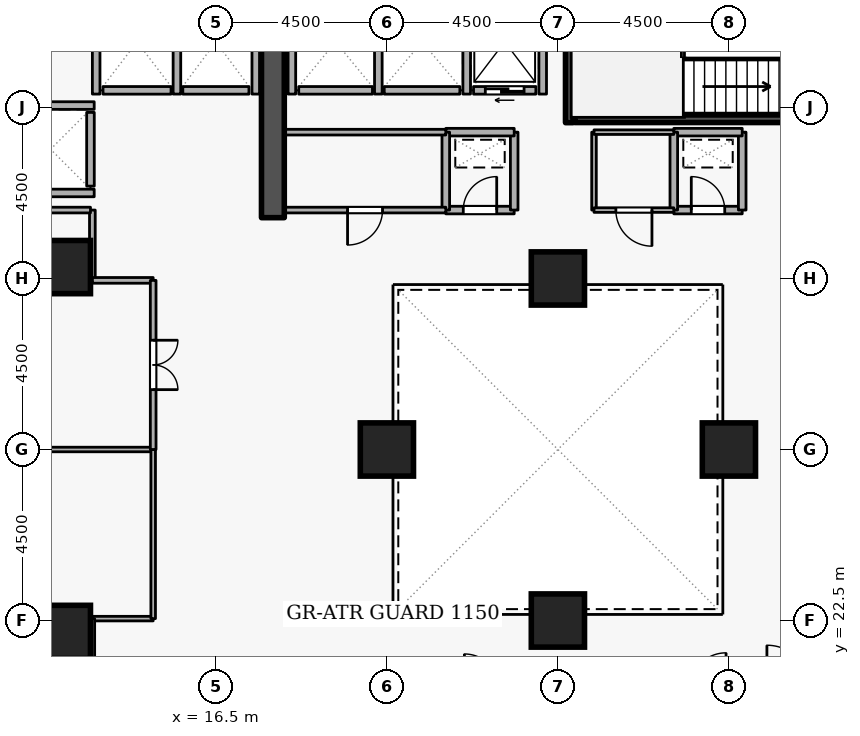
"""IFC4 building model, lengths in metres.
Left out: names, types, materials, properties, quantities, classifications, styles, units other than length and angle.
Written with IfcOpenShell. Run it as: python <this file> out.ifc"""

import sys

from ifc_helpers import new_model, si_unit, direction, frame, frame_2d, origin, origin_2d, place, context, subcontext, project, spatial, rectangle, extrude, element, fill, save


model = new_model("IFC4")
c1 = context("Model", 3, precision=1e-05, world=origin(), true_north=direction((0.0, 1.0)))
c2 = subcontext(c1, "Body", "Model", "MODEL_VIEW")
j1 = project(units=[si_unit("LENGTHUNIT", "METRE"), si_unit("PLANEANGLEUNIT", "RADIAN")], contexts=[c1])
p1 = place(None, origin())
s1 = spatial("IfcSite", under=j1, at=p1, CompositionType="ELEMENT")
p2 = place(p1, origin())
s2 = spatial("IfcBuilding", under=s1, at=p2, CompositionType="ELEMENT")
p3 = place(p2, frame((0.0, 0.0, 31.5)))
s3 = spatial("IfcBuildingStorey", under=s2, at=p3, CompositionType="ELEMENT", Elevation=31.5)
p4 = place(p3, frame((18.0, 33.1, 0.0), z_axis=(0.0, 0.0, 1.0), x_axis=(0.0, 1.0, 0.0)))
e1 = element("IfcWall", 1, at=p4, inside=s3, PredefinedType="SHEAR", context=c2, shape_type="SweptSolid", body=[
    extrude(rectangle(XDim=5.7, YDim=0.6, at=frame_2d((2.85, 0.0))), origin(), (0.0, 0.0, 1.0), 3.6),
])
for number, where, z_axis, x_axis in (
    (2, (12.5, 22.2, 0.0), (0.0, 0.0, 1.0), (1.0, 0.0, 0.0)),
    (3, (12.5, 31.8, 0.0), (0.0, 0.0, 1.0), (1.0, 0.0, 0.0)),
    (4, (25.5, 22.5, 0.0), (0.0, 0.0, 1.0), (1.0, 0.0, 0.0)),
    (5, (25.5, 31.5, 0.0), (0.0, 0.0, 1.0), (1.0, 0.0, 0.0)),
    (6, (21.0, 27.0, 0.0), (0.0, 0.0, 1.0), (1.0, 0.0, 0.0)),
    (7, (30.0, 27.0, 0.0), (0.0, 0.0, 1.0), (1.0, 0.0, 0.0)),
):
    element("IfcColumn", number, at=place(p3, frame(where, z_axis=z_axis, x_axis=x_axis)), inside=s3, PredefinedType="COLUMN", context=c2, shape_type="SweptSolid", body=[
        extrude(rectangle(XDim=1.4, YDim=1.4, at=origin_2d()), origin(), (0.0, 0.0, 1.0), 3.6),
    ])
p5 = place(p3, frame((24.92, 36.45, 0.0), z_axis=(0.0, 0.0, 1.0), x_axis=(-1.0, 0.0, 0.0)))
e8 = element("IfcWall", 8, at=p5, inside=s3, PredefinedType="STANDARD", context=c2, shape_type="SweptSolid", body=[
    extrude(rectangle(XDim=1.64, YDim=0.2, at=frame_2d((0.82, 0.0))), origin(), (0.0, 0.0, 1.0), 3.34),
])
p6 = place(p5, frame((0.31, 0.0, 0.0)))
e9 = element("IfcOpeningElement", 9, at=p6, cuts=e8, PredefinedType="OPENING", context=c2, shape_type="SweptSolid", body=[
    extrude(rectangle(XDim=1.02, YDim=2.06, at=frame_2d((0.51, 1.03))), frame((0.0, 0.11, 0.0), z_axis=(0.0, -1.0, 0.0), x_axis=(1.0, 0.0, 0.0)), (0.0, 0.0, 1.0), 0.22),
])
p7 = place(p3, frame((22.92, 36.45, 0.0), z_axis=(0.0, 0.0, 1.0), x_axis=(-1.0, 0.0, 0.0)))
e10 = element("IfcWall", 10, at=p7, inside=s3, PredefinedType="STANDARD", context=c2, shape_type="SweptSolid", body=[
    extrude(rectangle(XDim=1.99, YDim=0.2, at=frame_2d((0.995, 0.0))), origin(), (0.0, 0.0, 1.0), 3.34),
])
p8 = place(p3, frame((20.62, 36.45, 0.0), z_axis=(0.0, 0.0, 1.0), x_axis=(-1.0, 0.0, 0.0)))
e11 = element("IfcWall", 11, at=p8, inside=s3, PredefinedType="STANDARD", context=c2, shape_type="SweptSolid", body=[
    extrude(rectangle(XDim=1.94, YDim=0.2, at=frame_2d((0.97, 0.0))), origin(), (0.0, 0.0, 1.0), 3.34),
])
p9 = place(p3, frame((17.37, 36.45, 0.0), z_axis=(0.0, 0.0, 1.0), x_axis=(-1.0, 0.0, 0.0)))
e12 = element("IfcWall", 12, at=p9, inside=s3, PredefinedType="STANDARD", context=c2, shape_type="SweptSolid", body=[
    extrude(rectangle(XDim=1.74, YDim=0.2, at=frame_2d((0.87, 0.0))), origin(), (0.0, 0.0, 1.0), 3.34),
])
p10 = place(p3, frame((15.32, 36.45, 0.0), z_axis=(0.0, 0.0, 1.0), x_axis=(-1.0, 0.0, 0.0)))
e13 = element("IfcWall", 13, at=p10, inside=s3, PredefinedType="STANDARD", context=c2, shape_type="SweptSolid", body=[
    extrude(rectangle(XDim=1.79, YDim=0.2, at=frame_2d((0.895, 0.0))), origin(), (0.0, 0.0, 1.0), 3.34),
])
p11 = place(p3, frame((13.2, 33.93, 0.0), z_axis=(0.0, 0.0, 1.0), x_axis=(0.0, 1.0, 0.0)))
e14 = element("IfcWall", 14, at=p11, inside=s3, PredefinedType="STANDARD", context=c2, shape_type="SweptSolid", body=[
    extrude(rectangle(XDim=1.94, YDim=0.2, at=frame_2d((0.97, 0.0))), origin(), (0.0, 0.0, 1.0), 3.34),
])
for number, where, z_axis, x_axis in (
    (15, (25.1, 36.352, 0.0), (0.0, 0.0, 1.0), (0.0, 1.0, 0.0)),
    (16, (23.1, 36.352, 0.0), (0.0, 0.0, 1.0), (0.0, 1.0, 0.0)),
    (17, (20.775, 36.352, 0.0), (0.0, 0.0, 1.0), (0.0, 1.0, 0.0)),
    (18, (18.5, 36.352, 0.0), (0.0, 0.0, 1.0), (0.0, 1.0, 0.0)),
):
    element("IfcWall", number, at=place(p3, frame(where, z_axis=z_axis, x_axis=x_axis)), inside=s3, PredefinedType="STANDARD", context=c2, shape_type="SweptSolid", body=[
        extrude(rectangle(XDim=2.436, YDim=0.2, at=frame_2d((1.218, 0.0))), origin(), (0.0, 0.0, 1.0), 3.34),
    ])
p12 = place(p3, frame((17.55, 36.352, 0.0), z_axis=(0.0, 0.0, 1.0), x_axis=(0.0, 1.0, 0.0)))
e19 = element("IfcWall", 19, at=p12, inside=s3, PredefinedType="STANDARD", context=c2, shape_type="SweptSolid", body=[
    extrude(rectangle(XDim=2.636, YDim=0.2, at=frame_2d((1.318, 0.0))), origin(), (0.0, 0.0, 1.0), 2.545),
])
for number, where, z_axis, x_axis in (
    (20, (15.475, 36.352, 0.0), (0.0, 0.0, 1.0), (0.0, 1.0, 0.0)),
    (21, (13.35, 36.352, 0.0), (0.0, 0.0, 1.0), (0.0, 1.0, 0.0)),
):
    element("IfcWall", number, at=place(p3, frame(where, z_axis=z_axis, x_axis=x_axis)), inside=s3, PredefinedType="STANDARD", context=c2, shape_type="SweptSolid", body=[
        extrude(rectangle(XDim=2.636, YDim=0.2, at=frame_2d((1.318, 0.0))), origin(), (0.0, 0.0, 1.0), 3.34),
    ])
for number, where, z_axis, x_axis in (
    (22, (11.002, 36.05, 0.0), (0.0, 0.0, 1.0), (1.0, 0.0, 0.0)),
    (23, (11.002, 33.75, 0.0), (0.0, 0.0, 1.0), (1.0, 0.0, 0.0)),
):
    element("IfcWall", number, at=place(p3, frame(where, z_axis=z_axis, x_axis=x_axis)), inside=s3, PredefinedType="STANDARD", context=c2, shape_type="SweptSolid", body=[
        extrude(rectangle(XDim=2.296, YDim=0.2, at=frame_2d((1.148, 0.0))), origin(), (0.0, 0.0, 1.0), 3.34),
    ])
p13 = place(p3, frame((25.8, 35.6, 0.0), z_axis=(0.0, 0.0, 1.0), x_axis=(0.0, 1.0, 0.0)))
e24 = element("IfcWall", 24, at=p13, inside=s3, PredefinedType="SHEAR", context=c2, shape_type="SweptSolid", body=[
    extrude(rectangle(XDim=3.35, YDim=0.2, at=frame_2d((1.675, 0.0))), origin(), (0.0, 0.0, 1.0), 3.6),
])
p14 = place(p3, frame((25.95, 35.703, 0.0), z_axis=(0.0, 0.0, 1.0), x_axis=(1.0, 0.0, 0.0)))
e25 = element("IfcWall", 25, at=p14, inside=s3, PredefinedType="SHEAR", context=c2, shape_type="SweptSolid", body=[
    extrude(rectangle(XDim=7.1, YDim=0.2, at=frame_2d((3.55, 0.0))), origin(), (0.0, 0.0, 1.0), 3.6),
])
p15 = place(p3, frame((22.55, 33.3, 0.0), z_axis=(0.0, 0.0, 1.0), x_axis=(1.0, 0.0, 0.0)))
e26 = element("IfcWall", 26, at=p15, inside=s3, PredefinedType="STANDARD", context=c2, shape_type="SweptSolid", body=[
    extrude(rectangle(XDim=1.8, YDim=0.2, at=frame_2d((0.9, 0.0))), origin(), (0.0, 0.0, 1.0), 3.34),
])
p16 = place(p15, frame((0.46, 0.0, 0.0)))
e27 = element("IfcOpeningElement", 27, at=p16, cuts=e26, PredefinedType="OPENING", context=c2, shape_type="SweptSolid", body=[
    extrude(rectangle(XDim=0.88, YDim=2.04, at=frame_2d((0.44, 1.02))), frame((0.0, 0.11, 0.0), z_axis=(0.0, -1.0, 0.0), x_axis=(1.0, 0.0, 0.0)), (0.0, 0.0, 1.0), 0.22),
])
p17 = place(p3, frame((24.35, 33.3, 0.0), z_axis=(0.0, 0.0, 1.0), x_axis=(0.0, 1.0, 0.0)))
e28 = element("IfcWall", 28, at=p17, inside=s3, PredefinedType="STANDARD", context=c2, shape_type="SweptSolid", body=[
    extrude(rectangle(XDim=2.05, YDim=0.2, at=frame_2d((1.025, 0.0))), origin(), (0.0, 0.0, 1.0), 3.34),
])
p18 = place(p3, frame((24.35, 35.35, 0.0), z_axis=(0.0, 0.0, 1.0), x_axis=(-1.0, 0.0, 0.0)))
e29 = element("IfcWall", 29, at=p18, inside=s3, PredefinedType="STANDARD", context=c2, shape_type="SweptSolid", body=[
    extrude(rectangle(XDim=1.8, YDim=0.2, at=frame_2d((0.9, 0.0))), origin(), (0.0, 0.0, 1.0), 3.34),
])
p19 = place(p3, frame((22.55, 35.35, 0.0), z_axis=(0.0, 0.0, 1.0), x_axis=(0.0, -1.0, 0.0)))
e30 = element("IfcWall", 30, at=p19, inside=s3, PredefinedType="STANDARD", context=c2, shape_type="SweptSolid", body=[
    extrude(rectangle(XDim=2.05, YDim=0.2, at=frame_2d((1.025, 0.0))), origin(), (0.0, 0.0, 1.0), 3.34),
])
p20 = place(p3, frame((28.55, 33.3, 0.0), z_axis=(0.0, 0.0, 1.0), x_axis=(1.0, 0.0, 0.0)))
e31 = element("IfcWall", 31, at=p20, inside=s3, PredefinedType="STANDARD", context=c2, shape_type="SweptSolid", body=[
    extrude(rectangle(XDim=1.8, YDim=0.2, at=frame_2d((0.9, 0.0))), origin(), (0.0, 0.0, 1.0), 3.34),
])
p21 = place(p20, frame((0.46, 0.0, 0.0)))
e32 = element("IfcOpeningElement", 32, at=p21, cuts=e31, PredefinedType="OPENING", context=c2, shape_type="SweptSolid", body=[
    extrude(rectangle(XDim=0.88, YDim=2.04, at=frame_2d((0.44, 1.02))), frame((0.0, 0.11, 0.0), z_axis=(0.0, -1.0, 0.0), x_axis=(1.0, 0.0, 0.0)), (0.0, 0.0, 1.0), 0.22),
])
p22 = place(p3, frame((30.35, 33.3, 0.0), z_axis=(0.0, 0.0, 1.0), x_axis=(0.0, 1.0, 0.0)))
e33 = element("IfcWall", 33, at=p22, inside=s3, PredefinedType="STANDARD", context=c2, shape_type="SweptSolid", body=[
    extrude(rectangle(XDim=2.05, YDim=0.2, at=frame_2d((1.025, 0.0))), origin(), (0.0, 0.0, 1.0), 3.34),
])
p23 = place(p3, frame((30.35, 35.35, 0.0), z_axis=(0.0, 0.0, 1.0), x_axis=(-1.0, 0.0, 0.0)))
e34 = element("IfcWall", 34, at=p23, inside=s3, PredefinedType="STANDARD", context=c2, shape_type="SweptSolid", body=[
    extrude(rectangle(XDim=1.8, YDim=0.2, at=frame_2d((0.9, 0.0))), origin(), (0.0, 0.0, 1.0), 3.34),
])
p24 = place(p3, frame((28.55, 35.35, 0.0), z_axis=(0.0, 0.0, 1.0), x_axis=(0.0, -1.0, 0.0)))
e35 = element("IfcWall", 35, at=p24, inside=s3, PredefinedType="STANDARD", context=c2, shape_type="SweptSolid", body=[
    extrude(rectangle(XDim=2.05, YDim=0.2, at=frame_2d((1.025, 0.0))), origin(), (0.0, 0.0, 1.0), 3.34),
])
p25 = place(p3, frame((18.3, 35.35, 0.0), z_axis=(0.0, 0.0, 1.0), x_axis=(1.0, 0.0, 0.0)))
e36 = element("IfcWall", 36, at=p25, inside=s3, PredefinedType="PARTITIONING", context=c2, shape_type="SweptSolid", body=[
    extrude(rectangle(XDim=4.25, YDim=0.15, at=frame_2d((2.125, 0.0))), origin(), (0.0, 0.0, 1.0), 3.34),
])
p26 = place(p3, frame((22.55, 33.3, 0.0), z_axis=(0.0, 0.0, 1.0), x_axis=(-1.0, 0.0, 0.0)))
e37 = element("IfcWall", 37, at=p26, inside=s3, PredefinedType="PARTITIONING", context=c2, shape_type="SweptSolid", body=[
    extrude(rectangle(XDim=4.25, YDim=0.15, at=frame_2d((2.125, 0.0))), origin(), (0.0, 0.0, 1.0), 3.34),
])
p27 = place(p26, frame((1.665, 0.0, 0.0)))
e38 = element("IfcOpeningElement", 38, at=p27, cuts=e37, PredefinedType="OPENING", context=c2, shape_type="SweptSolid", body=[
    extrude(rectangle(XDim=0.92, YDim=2.08, at=frame_2d((0.46, 1.04))), frame((0.0, 0.085, 0.0), z_axis=(0.0, -1.0, 0.0), x_axis=(1.0, 0.0, 0.0)), (0.0, 0.0, 1.0), 0.17),
])
p28 = place(p3, frame((26.45, 33.3, 0.0), z_axis=(0.0, 0.0, 1.0), x_axis=(0.0, 1.0, 0.0)))
e39 = element("IfcWall", 39, at=p28, inside=s3, PredefinedType="PARTITIONING", context=c2, shape_type="SweptSolid", body=[
    extrude(rectangle(XDim=2.05, YDim=0.12, at=frame_2d((1.025, 0.0))), origin(), (0.0, 0.0, 1.0), 3.34),
])
p29 = place(p3, frame((26.45, 35.35, 0.0), z_axis=(0.0, 0.0, 1.0), x_axis=(1.0, 0.0, 0.0)))
e40 = element("IfcWall", 40, at=p29, inside=s3, PredefinedType="PARTITIONING", context=c2, shape_type="SweptSolid", body=[
    extrude(rectangle(XDim=2.1, YDim=0.12, at=frame_2d((1.05, 0.0))), origin(), (0.0, 0.0, 1.0), 3.34),
])
p30 = place(p3, frame((28.55, 33.3, 0.0), z_axis=(0.0, 0.0, 1.0), x_axis=(-1.0, 0.0, 0.0)))
e41 = element("IfcWall", 41, at=p30, inside=s3, PredefinedType="PARTITIONING", context=c2, shape_type="SweptSolid", body=[
    extrude(rectangle(XDim=2.1, YDim=0.12, at=frame_2d((1.05, 0.0))), origin(), (0.0, 0.0, 1.0), 3.34),
])
p31 = place(p30, frame((0.575, 0.0, 0.0)))
e42 = element("IfcOpeningElement", 42, at=p31, cuts=e41, PredefinedType="OPENING", context=c2, shape_type="SweptSolid", body=[
    extrude(rectangle(XDim=0.95, YDim=2.1, at=frame_2d((0.475, 1.05))), frame((0.0, 0.07, 0.0), z_axis=(0.0, -1.0, 0.0), x_axis=(1.0, 0.0, 0.0)), (0.0, 0.0, 1.0), 0.14),
])
p32 = place(p3, frame((14.85, 22.55, 0.0), z_axis=(0.0, 0.0, 1.0), x_axis=(-1.0, 0.0, 0.0)))
e43 = element("IfcWall", 43, at=p32, inside=s3, PredefinedType="PARTITIONING", context=c2, shape_type="SweptSolid", body=[
    extrude(rectangle(XDim=1.6, YDim=0.12, at=frame_2d((0.8, 0.0))), origin(), (0.0, 0.0, 1.0), 3.34),
])
p33 = place(p3, frame((13.25, 22.55, 0.0), z_axis=(0.0, 0.0, 1.0), x_axis=(0.0, -1.0, 0.0)))
e44 = element("IfcWall", 44, at=p33, inside=s3, PredefinedType="PARTITIONING", context=c2, shape_type="SweptSolid", body=[
    extrude(rectangle(XDim=1.85, YDim=0.12, at=frame_2d((0.925, 0.0))), origin(), (0.0, 0.0, 1.0), 3.34),
])
p34 = place(p3, frame((1.28, 27.0, 0.0), z_axis=(0.0, 0.0, 1.0), x_axis=(1.0, 0.0, 0.0)))
e45 = element("IfcWall", 45, at=p34, inside=s3, PredefinedType="PARTITIONING", context=c2, shape_type="SweptSolid", body=[
    extrude(rectangle(XDim=13.57, YDim=0.12, at=frame_2d((6.785, 0.0))), origin(), (0.0, 0.0, 1.0), 2.878),
])
p35 = place(p3, frame((14.85, 27.0, 0.0), z_axis=(0.0, 0.0, 1.0), x_axis=(0.0, -1.0, 0.0)))
e46 = element("IfcWall", 46, at=p35, inside=s3, PredefinedType="PARTITIONING", context=c2, shape_type="SweptSolid", body=[
    extrude(rectangle(XDim=4.45, YDim=0.12, at=frame_2d((2.225, 0.0))), origin(), (0.0, 0.0, 1.0), 3.34),
])
p36 = place(p3, frame((13.25, 33.3, 0.0), z_axis=(0.0, 0.0, 1.0), x_axis=(0.0, -1.0, 0.0)))
e47 = element("IfcWall", 47, at=p36, inside=s3, PredefinedType="PARTITIONING", context=c2, shape_type="SweptSolid", body=[
    extrude(rectangle(XDim=1.85, YDim=0.15, at=frame_2d((0.925, 0.0))), origin(), (0.0, 0.0, 1.0), 3.34),
])
p37 = place(p3, frame((13.25, 31.45, 0.0), z_axis=(0.0, 0.0, 1.0), x_axis=(1.0, 0.0, 0.0)))
e48 = element("IfcWall", 48, at=p37, inside=s3, PredefinedType="PARTITIONING", context=c2, shape_type="SweptSolid", body=[
    extrude(rectangle(XDim=1.6, YDim=0.15, at=frame_2d((0.8, 0.0))), origin(), (0.0, 0.0, 1.0), 3.34),
])
p38 = place(p3, frame((14.85, 31.45, 0.0), z_axis=(0.0, 0.0, 1.0), x_axis=(0.0, -1.0, 0.0)))
e49 = element("IfcWall", 49, at=p38, inside=s3, PredefinedType="PARTITIONING", context=c2, shape_type="SweptSolid", body=[
    extrude(rectangle(XDim=4.45, YDim=0.15, at=frame_2d((2.225, 0.0))), origin(), (0.0, 0.0, 1.0), 3.34),
])
p39 = place(p38, frame((1.575, 0.0, 0.0)))
e50 = element("IfcOpeningElement", 50, at=p39, cuts=e49, PredefinedType="OPENING", context=c2, shape_type="SweptSolid", body=[
    extrude(rectangle(XDim=1.3, YDim=2.12, at=frame_2d((0.65, 1.06))), frame((0.0, 0.085, 0.0), z_axis=(0.0, -1.0, 0.0), x_axis=(1.0, 0.0, 0.0)), (0.0, 0.0, 1.0), 0.17),
])
p40 = place(p3, frame((10.9, 33.3, 0.0), z_axis=(0.0, 0.0, 1.0), x_axis=(1.0, 0.0, 0.0)))
e51 = element("IfcWall", 51, at=p40, inside=s3, PredefinedType="PARTITIONING", context=c2, shape_type="SweptSolid", body=[
    extrude(rectangle(XDim=2.3, YDim=0.15, at=frame_2d((1.15, 0.0))), origin(), (0.0, 0.0, 1.0), 3.34),
])
p41 = place(p6, origin())
e52 = element("IfcDoor", 52, at=p41, inside=s3, OperationType="SLIDING_TO_LEFT", PredefinedType="DOOR", context=c2, shape_type="SweptSolid", body=[
    extrude(rectangle(XDim=1.02, YDim=2.06, at=frame_2d((0.51, 1.03))), frame((0.0, 0.025, 0.0), z_axis=(0.0, -1.0, 0.0), x_axis=(1.0, 0.0, 0.0)), (0.0, 0.0, 1.0), 0.05),
])
fill(e9, e52)
p42 = place(p16, origin())
e53 = element("IfcDoor", 53, at=p42, inside=s3, OperationType="SINGLE_SWING_RIGHT", PredefinedType="DOOR", context=c2, shape_type="SweptSolid", body=[
    extrude(rectangle(XDim=0.88, YDim=2.04, at=frame_2d((0.44, 1.02))), frame((0.0, 0.025, 0.0), z_axis=(0.0, -1.0, 0.0), x_axis=(1.0, 0.0, 0.0)), (0.0, 0.0, 1.0), 0.05),
])
fill(e27, e53)
p43 = place(p21, origin())
e54 = element("IfcDoor", 54, at=p43, inside=s3, OperationType="SINGLE_SWING_LEFT", PredefinedType="DOOR", context=c2, shape_type="SweptSolid", body=[
    extrude(rectangle(XDim=0.88, YDim=2.04, at=frame_2d((0.44, 1.02))), frame((0.0, 0.025, 0.0), z_axis=(0.0, -1.0, 0.0), x_axis=(1.0, 0.0, 0.0)), (0.0, 0.0, 1.0), 0.05),
])
fill(e32, e54)
p44 = place(p27, origin())
e55 = element("IfcDoor", 55, at=p44, inside=s3, OperationType="SINGLE_SWING_RIGHT", PredefinedType="DOOR", context=c2, shape_type="SweptSolid", body=[
    extrude(rectangle(XDim=0.92, YDim=2.08, at=frame_2d((0.46, 1.04))), frame((0.0, 0.025, 0.0), z_axis=(0.0, -1.0, 0.0), x_axis=(1.0, 0.0, 0.0)), (0.0, 0.0, 1.0), 0.05),
])
fill(e38, e55)
p45 = place(p31, origin())
e56 = element("IfcDoor", 56, at=p45, inside=s3, OperationType="SINGLE_SWING_LEFT", PredefinedType="DOOR", context=c2, shape_type="SweptSolid", body=[
    extrude(rectangle(XDim=0.95, YDim=2.1, at=frame_2d((0.475, 1.05))), frame((0.0, 0.025, 0.0), z_axis=(0.0, -1.0, 0.0), x_axis=(1.0, 0.0, 0.0)), (0.0, 0.0, 1.0), 0.05),
])
fill(e42, e56)
p46 = place(p39, origin())
e57 = element("IfcDoor", 57, at=p46, inside=s3, OperationType="DOUBLE_DOOR_SINGLE_SWING", PredefinedType="DOOR", context=c2, shape_type="SweptSolid", body=[
    extrude(rectangle(XDim=1.3, YDim=2.12, at=frame_2d((0.65, 1.06))), frame((0.0, 0.025, 0.0), z_axis=(0.0, -1.0, 0.0), x_axis=(1.0, 0.0, 0.0)), (0.0, 0.0, 1.0), 0.05),
])
fill(e50, e57)
save(model, sys.argv[1])
